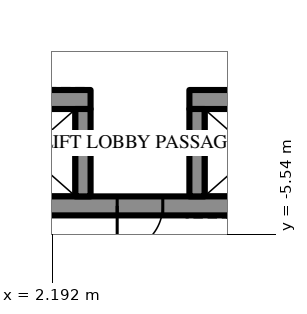
"""IFC4 building model, lengths in metres.
Left out: names, types, materials, properties, quantities, classifications, styles, units other than length and angle.
Written with IfcOpenShell. Run it as: python <this file> out.ifc"""

import sys

from ifc_helpers import new_model, si_unit, direction, frame, frame_2d, origin, place, context, subcontext, project, spatial, rectangle, extrude, element, fill, save


model = new_model("IFC4")
c1 = context("Model", 3, precision=1e-05, world=origin(), true_north=direction((0.0, 1.0)))
c2 = subcontext(c1, "Body", "Model", "MODEL_VIEW")
j1 = project(units=[si_unit("LENGTHUNIT", "METRE"), si_unit("PLANEANGLEUNIT", "RADIAN")], contexts=[c1])
p1 = place(None, origin())
s1 = spatial("IfcSite", under=j1, at=p1, CompositionType="ELEMENT")
p2 = place(p1, origin())
s2 = spatial("IfcBuilding", under=s1, at=p2, CompositionType="ELEMENT")
p3 = place(p2, frame((0.0, 0.0, 57.1)))
s3 = spatial("IfcBuildingStorey", under=s2, at=p3, CompositionType="ELEMENT", Elevation=57.1)
p4 = place(p3, frame((11.7, -2.0, 0.0), z_axis=(0.0, 0.0, 1.0), x_axis=(-1.0, 0.0, 0.0)))
e1 = element("IfcWall", 1, at=p4, inside=s3, PredefinedType="SHEAR", context=c2, shape_type="SweptSolid", body=[
    extrude(rectangle(XDim=5.9, YDim=0.5, at=frame_2d((2.95, 0.0))), origin(), (0.0, 0.0, 1.0), 4.2),
])
p5 = place(p3, frame((3.2, -2.0, 0.0), z_axis=(0.0, 0.0, 1.0), x_axis=(-1.0, 0.0, 0.0)))
e2 = element("IfcWall", 2, at=p5, inside=s3, PredefinedType="SHEAR", context=c2, shape_type="SweptSolid", body=[
    extrude(rectangle(XDim=14.9, YDim=0.5, at=frame_2d((7.45, 0.0))), origin(), (0.0, 0.0, 1.0), 4.2),
])
p6 = place(p5, frame((1.15, 0.0, 0.0)))
e3 = element("IfcOpeningElement", 3, at=p6, cuts=e2, PredefinedType="OPENING", context=c2, shape_type="SweptSolid", body=[
    extrude(rectangle(XDim=1.1, YDim=2.2, at=frame_2d((0.55, 1.1))), frame((0.0, 0.26, 0.0), z_axis=(0.0, -1.0, 0.0), x_axis=(1.0, 0.0, 0.0)), (0.0, 0.0, 1.0), 0.52),
])
p7 = place(p5, frame((4.15, 0.0, 0.0)))
e4 = element("IfcOpeningElement", 4, at=p7, cuts=e2, PredefinedType="OPENING", context=c2, shape_type="SweptSolid", body=[
    extrude(rectangle(XDim=1.1, YDim=2.2, at=frame_2d((0.55, 1.1))), frame((0.0, 0.26, 0.0), z_axis=(0.0, -1.0, 0.0), x_axis=(1.0, 0.0, 0.0)), (0.0, 0.0, 1.0), 0.52),
])
p8 = place(p5, frame((7.15, 0.0, 0.0)))
e5 = element("IfcOpeningElement", 5, at=p8, cuts=e2, PredefinedType="OPENING", context=c2, shape_type="SweptSolid", body=[
    extrude(rectangle(XDim=1.1, YDim=2.2, at=frame_2d((0.55, 1.1))), frame((0.0, 0.26, 0.0), z_axis=(0.0, -1.0, 0.0), x_axis=(1.0, 0.0, 0.0)), (0.0, 0.0, 1.0), 0.52),
])
p9 = place(p5, frame((10.15, 0.0, 0.0)))
e6 = element("IfcOpeningElement", 6, at=p9, cuts=e2, PredefinedType="OPENING", context=c2, shape_type="SweptSolid", body=[
    extrude(rectangle(XDim=1.1, YDim=2.2, at=frame_2d((0.55, 1.1))), frame((0.0, 0.26, 0.0), z_axis=(0.0, -1.0, 0.0), x_axis=(1.0, 0.0, 0.0)), (0.0, 0.0, 1.0), 0.52),
])
p10 = place(p3, frame((11.7, -4.8, 0.0), z_axis=(0.0, 0.0, 1.0), x_axis=(-1.0, 0.0, 0.0)))
e7 = element("IfcWall", 7, at=p10, inside=s3, PredefinedType="SHEAR", context=c2, shape_type="SweptSolid", body=[
    extrude(rectangle(XDim=23.4, YDim=0.5, at=frame_2d((11.7, 0.0))), origin(), (0.0, 0.0, 1.0), 4.2),
])
p11 = place(p10, frame((6.6, 0.0, 0.0)))
e8 = element("IfcOpeningElement", 8, at=p11, cuts=e7, PredefinedType="OPENING", context=c2, shape_type="SweptSolid", body=[
    extrude(rectangle(XDim=1.2, YDim=2.2, at=frame_2d((0.6, 1.1))), frame((0.0, 0.26, 0.0), z_axis=(0.0, -1.0, 0.0), x_axis=(1.0, 0.0, 0.0)), (0.0, 0.0, 1.0), 0.52),
])
p12 = place(p10, frame((3.6, 0.0, 0.0)))
e9 = element("IfcOpeningElement", 9, at=p12, cuts=e7, PredefinedType="OPENING", context=c2, shape_type="SweptSolid", body=[
    extrude(rectangle(XDim=1.2, YDim=2.2, at=frame_2d((0.6, 1.1))), frame((0.0, 0.26, 0.0), z_axis=(0.0, -1.0, 0.0), x_axis=(1.0, 0.0, 0.0)), (0.0, 0.0, 1.0), 0.52),
])
for number, where, z_axis, x_axis in (
    (10, (6.0, -2.25, 0.0), (0.0, 0.0, 1.0), (0.0, -1.0, 0.0)),
    (11, (3.0, -2.25, 0.0), (0.0, 0.0, 1.0), (0.0, -1.0, 0.0)),
):
    element("IfcWall", number, at=place(p3, frame(where, z_axis=z_axis, x_axis=x_axis)), inside=s3, PredefinedType="SHEAR", context=c2, shape_type="SweptSolid", body=[
        extrude(rectangle(XDim=2.3, YDim=0.4, at=frame_2d((1.15, 0.0))), origin(), (0.0, 0.0, 1.0), 4.2),
    ])
p13 = place(p11, origin())
e12 = element("IfcDoor", 12, at=p13, inside=s3, OperationType="SINGLE_SWING_LEFT", PredefinedType="DOOR", context=c2, shape_type="SweptSolid", body=[
    extrude(rectangle(XDim=1.2, YDim=2.2, at=frame_2d((0.6, 1.1))), frame((0.0, 0.025, 0.0), z_axis=(0.0, -1.0, 0.0), x_axis=(1.0, 0.0, 0.0)), (0.0, 0.0, 1.0), 0.05),
])
fill(e8, e12)
save(model, sys.argv[1])
